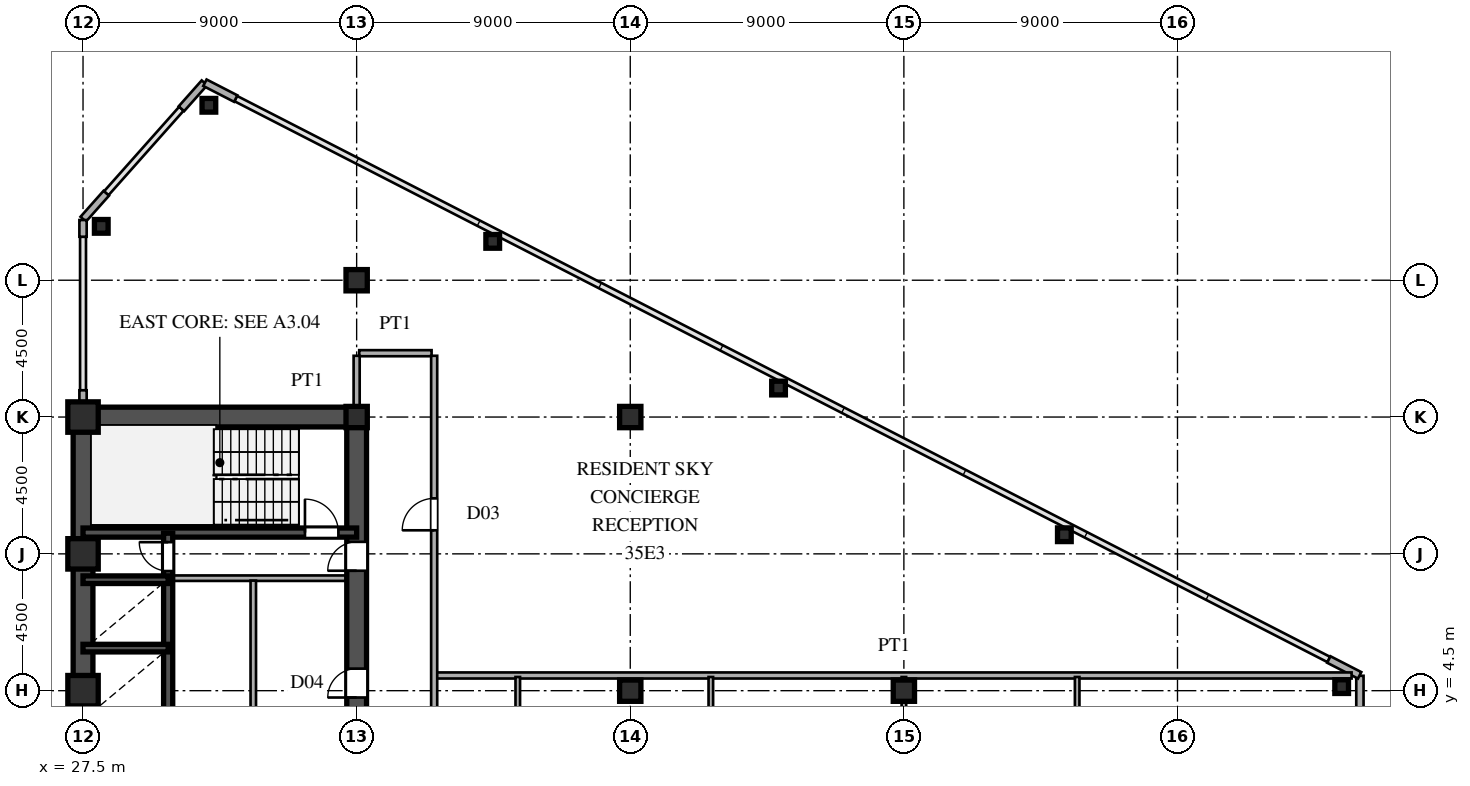
"""IFC4 building model, lengths in metres.
Left out: names, types, materials, properties, quantities, classifications, styles, units other than length and angle.
Written with IfcOpenShell. Run it as: python <this file> out.ifc"""

import sys

from ifc_helpers import new_model, si_unit, direction, frame, frame_2d, origin, origin_2d, place, context, subcontext, project, spatial, rectangle, hollow_rectangle, i_section, extrude, source, transform, mapped, element, fill, save


model = new_model("IFC4")
c1 = context("Model", 3, precision=1e-05, world=origin(), true_north=direction((0.0, 1.0)))
c2 = subcontext(c1, "Body", "Model", "MODEL_VIEW")
j1 = project(units=[si_unit("LENGTHUNIT", "METRE"), si_unit("PLANEANGLEUNIT", "RADIAN")], contexts=[c1])
p1 = place(None, origin())
s1 = spatial("IfcSite", under=j1, at=p1, CompositionType="ELEMENT")
p2 = place(p1, origin())
s2 = spatial("IfcBuilding", under=s1, at=p2, CompositionType="ELEMENT")
p3 = place(p2, frame((0.0, 0.0, 132.0)))
s3 = spatial("IfcBuildingStorey", under=s2, at=p3, CompositionType="ELEMENT", Elevation=132.0)
m1 = source(origin(), c2, "Body", "SweptSolid", [
    extrude(hollow_rectangle(XDim=1.0, YDim=1.0, WallThickness=0.042, at=origin_2d()), origin(), (0.0, 0.0, 1.0), 3.6),
])
for number, where, z_axis, x_axis in (
    (1, (27.5, 4.5, 0.0), (0.0, 0.0, 1.0), (1.0, 0.0, 0.0)),
    (2, (27.5, 9.0, 0.0), (0.0, 0.0, 1.0), (1.0, 0.0, 0.0)),
    (3, (27.5, 13.5, 0.0), (0.0, 0.0, 1.0), (1.0, 0.0, 0.0)),
):
    element("IfcColumn", number, at=place(p3, frame(where, z_axis=z_axis, x_axis=x_axis)), inside=s3, PredefinedType="COLUMN", context=c2, shape_type="MappedRepresentation", body=[
        mapped(m1, transform((0.0, 0.0, 0.0), scale=1.0)),
    ])
m2 = source(origin(), c2, "Body", "SweptSolid", [
    extrude(i_section(OverallWidth=0.7, OverallDepth=0.7, WebThickness=0.028, FlangeThickness=0.045, at=origin_2d()), origin(), (0.0, 0.0, 1.0), 3.6),
])
for number, where, z_axis, x_axis in (
    (4, (36.5, 13.5, 0.0), (0.0, 0.0, 1.0), (1.0, 0.0, 0.0)),
    (5, (36.5, 18.0, 0.0), (0.0, 0.0, 1.0), (1.0, 0.0, 0.0)),
    (6, (45.5, 4.5, 0.0), (0.0, 0.0, 1.0), (1.0, 0.0, 0.0)),
    (7, (45.5, 13.5, 0.0), (0.0, 0.0, 1.0), (1.0, 0.0, 0.0)),
    (8, (54.5, 4.5, 0.0), (0.0, 0.0, 1.0), (1.0, 0.0, 0.0)),
):
    element("IfcColumn", number, at=place(p3, frame(where, z_axis=z_axis, x_axis=x_axis)), inside=s3, PredefinedType="COLUMN", context=c2, shape_type="MappedRepresentation", body=[
        mapped(m2, transform((0.0, 0.0, 0.0), scale=1.0)),
    ])
m3 = source(origin(), c2, "Body", "SweptSolid", [
    extrude(hollow_rectangle(XDim=0.45, YDim=0.45, WallThickness=0.018, at=origin_2d()), origin(), (0.0, 0.0, 1.0), 3.6),
])
for number, where, z_axis, x_axis in (
    (9, (68.9, 4.634, 0.0), (0.0, 0.0, 1.0), (1.0, 0.0, 0.0)),
    (10, (31.64, 23.754, 0.0), (0.0, 0.0, 1.0), (1.0, 0.0, 0.0)),
    (11, (28.1, 19.772, 0.0), (0.0, 0.0, 1.0), (1.0, 0.0, 0.0)),
    (12, (40.976, 19.278, 0.0), (0.0, 0.0, 1.0), (1.0, 0.0, 0.0)),
    (13, (50.377, 14.453, 0.0), (0.0, 0.0, 1.0), (1.0, 0.0, 0.0)),
    (14, (59.779, 9.629, 0.0), (0.0, 0.0, 1.0), (1.0, 0.0, 0.0)),
):
    element("IfcColumn", number, at=place(p3, frame(where, z_axis=z_axis, x_axis=x_axis)), inside=s3, PredefinedType="COLUMN", context=c2, shape_type="MappedRepresentation", body=[
        mapped(m3, transform((0.0, 0.0, 0.0), scale=1.0)),
    ])
p4 = place(p3, frame((69.5, 3.85, 0.0), z_axis=(0.0, 0.0, 1.0), x_axis=(0.0, 1.0, 0.0)))
e15 = element("IfcWall", 15, at=p4, inside=s3, PredefinedType="SOLIDWALL", context=c2, shape_type="SweptSolid", body=[
    extrude(rectangle(XDim=1.14, YDim=0.24, at=frame_2d((0.57, 0.0))), origin(), (0.0, 0.0, 1.0), 3.34),
])
for number, where, z_axis, x_axis in (
    (16, (69.491, 5.005, 0.0), (0.0, 0.0, 1.0), (-0.89, 0.456, 0.0)),
    (17, (32.523, 23.975, 0.0), (0.0, 0.0, 1.0), (-0.89, 0.456, 0.0)),
):
    element("IfcWall", number, at=place(p3, frame(where, z_axis=z_axis, x_axis=x_axis)), inside=s3, PredefinedType="SOLIDWALL", context=c2, shape_type="SweptSolid", body=[
        extrude(rectangle(XDim=1.14, YDim=0.24, at=frame_2d((0.57, 0.0))), origin(), (0.0, 0.0, 1.0), 3.34),
    ])
for number, where, z_axis, x_axis in (
    (18, (31.493, 24.492, 0.0), (0.0, 0.0, 1.0), (-0.664, -0.747, 0.0)),
    (19, (28.264, 20.86, 0.0), (0.0, 0.0, 1.0), (-0.664, -0.747, 0.0)),
):
    element("IfcWall", number, at=place(p3, frame(where, z_axis=z_axis, x_axis=x_axis)), inside=s3, PredefinedType="SOLIDWALL", context=c2, shape_type="SweptSolid", body=[
        extrude(rectangle(XDim=1.14, YDim=0.24, at=frame_2d((0.57, 0.0))), origin(), (0.0, 0.0, 1.0), 3.34),
    ])
p5 = place(p3, frame((27.5, 13.83, 0.0), z_axis=(0.0, 0.0, 1.0), x_axis=(0.0, 1.0, 0.0)))
e20 = element("IfcWall", 20, at=p5, inside=s3, PredefinedType="SOLIDWALL", context=c2, shape_type="SweptSolid", body=[
    extrude(rectangle(XDim=0.55, YDim=0.24, at=frame_2d((0.275, 0.0))), origin(), (0.0, 0.0, 1.0), 2.79),
])
p6 = place(p3, frame((27.5, 19.43, 0.0), z_axis=(0.0, 0.0, 1.0), x_axis=(0.0, 1.0, 0.0)))
e21 = element("IfcWall", 21, at=p6, inside=s3, PredefinedType="SOLIDWALL", context=c2, shape_type="SweptSolid", body=[
    extrude(rectangle(XDim=0.55, YDim=0.24, at=frame_2d((0.275, 0.0))), origin(), (0.0, 0.0, 1.0), 3.34),
])
p7 = place(p3, frame((27.5, 1.3, 0.0), z_axis=(0.0, 0.0, 1.0), x_axis=(0.0, 1.0, 0.0)))
e22 = element("IfcWall", 22, at=p7, inside=s3, PredefinedType="SHEAR", context=c2, shape_type="SweptSolid", body=[
    extrude(rectangle(XDim=12.2, YDim=0.65, at=frame_2d((6.1, 0.0))), origin(), (0.0, 0.0, 1.0), 3.34),
])
p8 = place(p3, frame((27.5, 13.5, 0.0), z_axis=(0.0, 0.0, 1.0), x_axis=(1.0, 0.0, 0.0)))
e23 = element("IfcWall", 23, at=p8, inside=s3, PredefinedType="SHEAR", context=c2, shape_type="SweptSolid", body=[
    extrude(rectangle(XDim=9.0, YDim=0.65, at=frame_2d((4.5, 0.0))), origin(), (0.0, 0.0, 1.0), 3.34),
])
p9 = place(p3, frame((36.5, 8.2, 0.0), z_axis=(0.0, 0.0, 1.0), x_axis=(0.0, 1.0, 0.0)))
e24 = element("IfcWall", 24, at=p9, inside=s3, PredefinedType="SHEAR", context=c2, shape_type="SweptSolid", body=[
    extrude(rectangle(XDim=5.45, YDim=0.65, at=frame_2d((2.725, 0.0))), origin(), (0.0, 0.0, 1.0), 3.34),
])
p10 = place(p9, frame((0.245, 0.0, 0.0)))
e25 = element("IfcOpeningElement", 25, at=p10, cuts=e24, PredefinedType="OPENING", context=c2, shape_type="SweptSolid", body=[
    extrude(rectangle(XDim=0.95, YDim=2.15, at=frame_2d((0.475, 1.075))), frame((0.0, 0.335, 0.0), z_axis=(0.0, -1.0, 0.0), x_axis=(1.0, 0.0, 0.0)), (0.0, 0.0, 1.0), 0.67),
])
p11 = place(p3, frame((36.5, 1.3, 0.0), z_axis=(0.0, 0.0, 1.0), x_axis=(0.0, 1.0, 0.0)))
e26 = element("IfcWall", 26, at=p11, inside=s3, PredefinedType="SHEAR", context=c2, shape_type="SweptSolid", body=[
    extrude(rectangle(XDim=6.9, YDim=0.65, at=frame_2d((3.45, 0.0))), origin(), (0.0, 0.0, 1.0), 3.34),
])
p12 = place(p11, frame((2.975, 0.0, 0.0)))
e27 = element("IfcOpeningElement", 27, at=p12, cuts=e26, PredefinedType="OPENING", context=c2, shape_type="SweptSolid", body=[
    extrude(rectangle(XDim=0.95, YDim=2.15, at=frame_2d((0.475, 1.075))), frame((0.0, 0.335, 0.0), z_axis=(0.0, -1.0, 0.0), x_axis=(1.0, 0.0, 0.0)), (0.0, 0.0, 1.0), 0.67),
])
p13 = place(p3, frame((27.5, 9.7, 0.0), z_axis=(0.0, 0.0, 1.0), x_axis=(1.0, 0.0, 0.0)))
e28 = element("IfcWall", 28, at=p13, inside=s3, PredefinedType="SHEAR", context=c2, shape_type="SweptSolid", body=[
    extrude(rectangle(XDim=9.0, YDim=0.3, at=frame_2d((4.5, 0.0))), origin(), (0.0, 0.0, 1.0), 3.34),
])
p14 = place(p13, frame((7.3, 0.0, 0.0)))
e29 = element("IfcOpeningElement", 29, at=p14, cuts=e28, PredefinedType="OPENING", context=c2, shape_type="SweptSolid", body=[
    extrude(rectangle(XDim=1.1, YDim=2.2, at=frame_2d((0.55, 1.1))), frame((0.0, 0.16, 0.0), z_axis=(0.0, -1.0, 0.0), x_axis=(1.0, 0.0, 0.0)), (0.0, 0.0, 1.0), 0.32),
])
for number, where, z_axis, x_axis in (
    (30, (27.5, 5.9, 0.0), (0.0, 0.0, 1.0), (1.0, 0.0, 0.0)),
    (31, (27.5, 8.15, 0.0), (0.0, 0.0, 1.0), (1.0, 0.0, 0.0)),
):
    element("IfcWall", number, at=place(p3, frame(where, z_axis=z_axis, x_axis=x_axis)), inside=s3, PredefinedType="SHEAR", context=c2, shape_type="SweptSolid", body=[
        extrude(rectangle(XDim=2.8, YDim=0.25, at=frame_2d((1.4, 0.0))), origin(), (0.0, 0.0, 1.0), 3.34),
    ])
p15 = place(p3, frame((30.3, 3.6, 0.0), z_axis=(0.0, 0.0, 1.0), x_axis=(0.0, 1.0, 0.0)))
e32 = element("IfcWall", 32, at=p15, inside=s3, PredefinedType="SHEAR", context=c2, shape_type="SweptSolid", body=[
    extrude(rectangle(XDim=2.3, YDim=0.3, at=frame_2d((1.15, 0.0))), origin(), (0.0, 0.0, 1.0), 3.34),
])
p16 = place(p3, frame((30.3, 5.9, 0.0), z_axis=(0.0, 0.0, 1.0), x_axis=(0.0, 1.0, 0.0)))
e33 = element("IfcWall", 33, at=p16, inside=s3, PredefinedType="SHEAR", context=c2, shape_type="SweptSolid", body=[
    extrude(rectangle(XDim=2.25, YDim=0.3, at=frame_2d((1.125, 0.0))), origin(), (0.0, 0.0, 1.0), 3.34),
])
p17 = place(p3, frame((30.3, 8.15, 0.0), z_axis=(0.0, 0.0, 1.0), x_axis=(0.0, 1.0, 0.0)))
e34 = element("IfcWall", 34, at=p17, inside=s3, PredefinedType="SHEAR", context=c2, shape_type="SweptSolid", body=[
    extrude(rectangle(XDim=1.53, YDim=0.3, at=frame_2d((0.765, 0.0))), origin(), (0.0, 0.0, 1.0), 3.34),
])
p18 = place(p17, frame((0.285, 0.0, 0.0)))
e35 = element("IfcOpeningElement", 35, at=p18, cuts=e34, PredefinedType="OPENING", context=c2, shape_type="SweptSolid", body=[
    extrude(rectangle(XDim=0.95, YDim=2.15, at=frame_2d((0.475, 1.075))), frame((0.0, 0.16, 0.0), z_axis=(0.0, -1.0, 0.0), x_axis=(1.0, 0.0, 0.0)), (0.0, 0.0, 1.0), 0.32),
])
p19 = place(p3, frame((30.45, 8.2, 0.0), z_axis=(0.0, 0.0, 1.0), x_axis=(1.0, 0.0, 0.0)))
e36 = element("IfcWall", 36, at=p19, inside=s3, PredefinedType="PARTITIONING", context=c2, shape_type="SweptSolid", body=[
    extrude(rectangle(XDim=5.7, YDim=0.18, at=frame_2d((2.85, 0.0))), origin(), (0.0, 0.0, 1.0), 3.34),
])
p20 = place(p3, frame((33.1, 1.38, 0.0), z_axis=(0.0, 0.0, 1.0), x_axis=(0.0, 1.0, 0.0)))
e37 = element("IfcWall", 37, at=p20, inside=s3, PredefinedType="PARTITIONING", context=c2, shape_type="SweptSolid", body=[
    extrude(rectangle(XDim=6.74, YDim=0.18, at=frame_2d((3.37, 0.0))), origin(), (0.0, 0.0, 1.0), 3.34),
])
p21 = place(p3, frame((39.13, 5.0, 0.0), z_axis=(0.0, 0.0, 1.0), x_axis=(1.0, 0.0, 0.0)))
e38 = element("IfcWall", 38, at=p21, inside=s3, PredefinedType="PARTITIONING", context=c2, shape_type="SweptSolid", body=[
    extrude(rectangle(XDim=30.096, YDim=0.2, at=frame_2d((15.048, 0.0))), origin(), (0.0, 0.0, 1.0), 3.34),
])
p22 = place(p3, frame((36.585, 15.6, 0.0), z_axis=(0.0, 0.0, 1.0), x_axis=(1.0, 0.0, 0.0)))
e39 = element("IfcWall", 39, at=p22, inside=s3, PredefinedType="PARTITIONING", context=c2, shape_type="SweptSolid", body=[
    extrude(rectangle(XDim=2.38, YDim=0.2, at=frame_2d((1.19, 0.0))), origin(), (0.0, 0.0, 1.0), 3.34),
])
p23 = place(p3, frame((36.5, 13.83, 0.0), z_axis=(0.0, 0.0, 1.0), x_axis=(0.0, 1.0, 0.0)))
e40 = element("IfcWall", 40, at=p23, inside=s3, PredefinedType="PARTITIONING", context=c2, shape_type="SweptSolid", body=[
    extrude(rectangle(XDim=1.685, YDim=0.2, at=frame_2d((0.842, 0.0))), origin(), (0.0, 0.0, 1.0), 2.44),
])
p24 = place(p3, frame((39.05, -15.515, 0.0), z_axis=(0.0, 0.0, 1.0), x_axis=(0.0, 1.0, 0.0)))
e41 = element("IfcWall", 41, at=p24, inside=s3, PredefinedType="PARTITIONING", context=c2, shape_type="SweptSolid", body=[
    extrude(rectangle(XDim=31.03, YDim=0.2, at=frame_2d((15.515, 0.0))), origin(), (0.0, 0.0, 1.0), 3.34),
])
p25 = place(p24, frame((1.845, 0.0, 0.0)))
e42 = element("IfcOpeningElement", 42, at=p25, cuts=e41, PredefinedType="OPENING", context=c2, shape_type="SweptSolid", body=[
    extrude(rectangle(XDim=1.05, YDim=2.25, at=frame_2d((0.525, 1.125))), frame((0.0, 0.11, 0.0), z_axis=(0.0, -1.0, 0.0), x_axis=(1.0, 0.0, 0.0)), (0.0, 0.0, 1.0), 0.22),
])
p26 = place(p24, frame((12.78, 0.0, 0.0)))
e43 = element("IfcOpeningElement", 43, at=p26, cuts=e41, PredefinedType="OPENING", context=c2, shape_type="SweptSolid", body=[
    extrude(rectangle(XDim=1.05, YDim=2.25, at=frame_2d((0.525, 1.125))), frame((0.0, 0.11, 0.0), z_axis=(0.0, -1.0, 0.0), x_axis=(1.0, 0.0, 0.0)), (0.0, 0.0, 1.0), 0.22),
])
p27 = place(p24, frame((25.29, 0.0, 0.0)))
e44 = element("IfcOpeningElement", 44, at=p27, cuts=e41, PredefinedType="OPENING", context=c2, shape_type="SweptSolid", body=[
    extrude(rectangle(XDim=1.05, YDim=2.25, at=frame_2d((0.525, 1.125))), frame((0.0, 0.11, 0.0), z_axis=(0.0, -1.0, 0.0), x_axis=(1.0, 0.0, 0.0)), (0.0, 0.0, 1.0), 0.22),
])
p28 = place(p3, frame((41.8, 0.852, 0.0), z_axis=(0.0, 0.0, 1.0), x_axis=(0.0, 1.0, 0.0)))
e45 = element("IfcWall", 45, at=p28, inside=s3, PredefinedType="PARTITIONING", context=c2, shape_type="SweptSolid", body=[
    extrude(rectangle(XDim=4.098, YDim=0.15, at=frame_2d((2.049, 0.0))), origin(), (0.0, 0.0, 1.0), 3.34),
])
p29 = place(p3, frame((48.15, -8.95, 0.0), z_axis=(0.0, 0.0, 1.0), x_axis=(0.0, 1.0, 0.0)))
e46 = element("IfcWall", 46, at=p29, inside=s3, PredefinedType="PARTITIONING", context=c2, shape_type="SweptSolid", body=[
    extrude(rectangle(XDim=13.9, YDim=0.15, at=frame_2d((6.95, 0.0))), origin(), (0.0, 0.0, 1.0), 3.34),
])
p30 = place(p29, frame((6.475, 0.0, 0.0)))
e47 = element("IfcOpeningElement", 47, at=p30, cuts=e46, PredefinedType="OPENING", context=c2, shape_type="SweptSolid", body=[
    extrude(rectangle(XDim=0.95, YDim=2.15, at=frame_2d((0.475, 1.075))), frame((0.0, 0.085, 0.0), z_axis=(0.0, -1.0, 0.0), x_axis=(1.0, 0.0, 0.0)), (0.0, 0.0, 1.0), 0.17),
])
p31 = place(p29, frame((1.808, 0.0, 0.0)))
e48 = element("IfcOpeningElement", 48, at=p31, cuts=e46, PredefinedType="OPENING", context=c2, shape_type="SweptSolid", body=[
    extrude(rectangle(XDim=0.95, YDim=2.15, at=frame_2d((0.475, 1.075))), frame((0.0, 0.085, 0.0), z_axis=(0.0, -1.0, 0.0), x_axis=(1.0, 0.0, 0.0)), (0.0, 0.0, 1.0), 0.17),
])
p32 = place(p3, frame((54.5, -4.52, 0.0), z_axis=(0.0, 0.0, 1.0), x_axis=(0.0, 1.0, 0.0)))
e49 = element("IfcWall", 49, at=p32, inside=s3, PredefinedType="PARTITIONING", context=c2, shape_type="SweptSolid", body=[
    extrude(rectangle(XDim=9.47, YDim=0.15, at=frame_2d((4.735, 0.0))), origin(), (0.0, 0.0, 1.0), 2.44),
])
p33 = place(p32, frame((2.045, 0.0, 0.0)))
e50 = element("IfcOpeningElement", 50, at=p33, cuts=e49, PredefinedType="OPENING", context=c2, shape_type="SweptSolid", body=[
    extrude(rectangle(XDim=0.95, YDim=2.15, at=frame_2d((0.475, 1.075))), frame((0.0, 0.085, 0.0), z_axis=(0.0, -1.0, 0.0), x_axis=(1.0, 0.0, 0.0)), (0.0, 0.0, 1.0), 0.17),
])
p34 = place(p32, frame((6.712, 0.0, 0.0)))
e51 = element("IfcOpeningElement", 51, at=p34, cuts=e49, PredefinedType="OPENING", context=c2, shape_type="SweptSolid", body=[
    extrude(rectangle(XDim=0.95, YDim=2.15, at=frame_2d((0.475, 1.075))), frame((0.0, 0.085, 0.0), z_axis=(0.0, -1.0, 0.0), x_axis=(1.0, 0.0, 0.0)), (0.0, 0.0, 1.0), 0.17),
])
p35 = place(p3, frame((60.2, -4.283, 0.0), z_axis=(0.0, 0.0, 1.0), x_axis=(0.0, 1.0, 0.0)))
e52 = element("IfcWall", 52, at=p35, inside=s3, PredefinedType="PARTITIONING", context=c2, shape_type="SweptSolid", body=[
    extrude(rectangle(XDim=9.233, YDim=0.15, at=frame_2d((4.616, 0.0))), origin(), (0.0, 0.0, 1.0), 3.34),
])
p36 = place(p35, frame((1.808, 0.0, 0.0)))
e53 = element("IfcOpeningElement", 53, at=p36, cuts=e52, PredefinedType="OPENING", context=c2, shape_type="SweptSolid", body=[
    extrude(rectangle(XDim=0.95, YDim=2.15, at=frame_2d((0.475, 1.075))), frame((0.0, 0.085, 0.0), z_axis=(0.0, -1.0, 0.0), x_axis=(1.0, 0.0, 0.0)), (0.0, 0.0, 1.0), 0.17),
])
p37 = place(p35, frame((6.475, 0.0, 0.0)))
e54 = element("IfcOpeningElement", 54, at=p37, cuts=e52, PredefinedType="OPENING", context=c2, shape_type="SweptSolid", body=[
    extrude(rectangle(XDim=0.95, YDim=2.15, at=frame_2d((0.475, 1.075))), frame((0.0, 0.085, 0.0), z_axis=(0.0, -1.0, 0.0), x_axis=(1.0, 0.0, 0.0)), (0.0, 0.0, 1.0), 0.17),
])
m4 = source(origin(), c2, "Body", "SweptSolid", [
    extrude(rectangle(XDim=0.95, YDim=2.15, at=frame_2d((0.475, 1.075))), frame((0.0, 0.025, 0.0), z_axis=(0.0, -1.0, 0.0), x_axis=(1.0, 0.0, 0.0)), (0.0, 0.0, 1.0), 0.05),
])
p38 = place(p10, origin())
e55 = element("IfcDoor", 55, at=p38, inside=s3, OperationType="SINGLE_SWING_LEFT", PredefinedType="DOOR", context=c2, shape_type="MappedRepresentation", body=[
    mapped(m4, transform((0.0, 0.0, 0.0), scale=1.0)),
])
fill(e25, e55)
p39 = place(p12, origin())
e56 = element("IfcDoor", 56, at=p39, inside=s3, OperationType="SINGLE_SWING_LEFT", PredefinedType="DOOR", context=c2, shape_type="MappedRepresentation", body=[
    mapped(m4, transform((0.0, 0.0, 0.0), scale=1.0)),
])
fill(e27, e56)
m5 = source(origin(), c2, "Body", "SweptSolid", [
    extrude(rectangle(XDim=1.1, YDim=2.2, at=frame_2d((0.55, 1.1))), frame((0.0, 0.025, 0.0), z_axis=(0.0, -1.0, 0.0), x_axis=(1.0, 0.0, 0.0)), (0.0, 0.0, 1.0), 0.05),
])
p40 = place(p14, origin())
e57 = element("IfcDoor", 57, at=p40, inside=s3, OperationType="SINGLE_SWING_LEFT", PredefinedType="DOOR", context=c2, shape_type="MappedRepresentation", body=[
    mapped(m5, transform((0.0, 0.0, 0.0), scale=1.0)),
])
fill(e29, e57)
p41 = place(p18, origin())
e58 = element("IfcDoor", 58, at=p41, inside=s3, OperationType="SINGLE_SWING_RIGHT", PredefinedType="DOOR", context=c2, shape_type="MappedRepresentation", body=[
    mapped(m4, transform((0.0, 0.0, 0.0), scale=1.0)),
])
fill(e35, e58)
m6 = source(origin(), c2, "Body", "SweptSolid", [
    extrude(rectangle(XDim=1.05, YDim=2.25, at=frame_2d((0.525, 1.125))), frame((0.0, 0.025, 0.0), z_axis=(0.0, -1.0, 0.0), x_axis=(1.0, 0.0, 0.0)), (0.0, 0.0, 1.0), 0.05),
])
p42 = place(p27, origin())
e59 = element("IfcDoor", 59, at=p42, inside=s3, OperationType="SINGLE_SWING_LEFT", PredefinedType="DOOR", context=c2, shape_type="MappedRepresentation", body=[
    mapped(m6, transform((0.0, 0.0, 0.0), scale=1.0)),
])
fill(e44, e59)
save(model, sys.argv[1])
